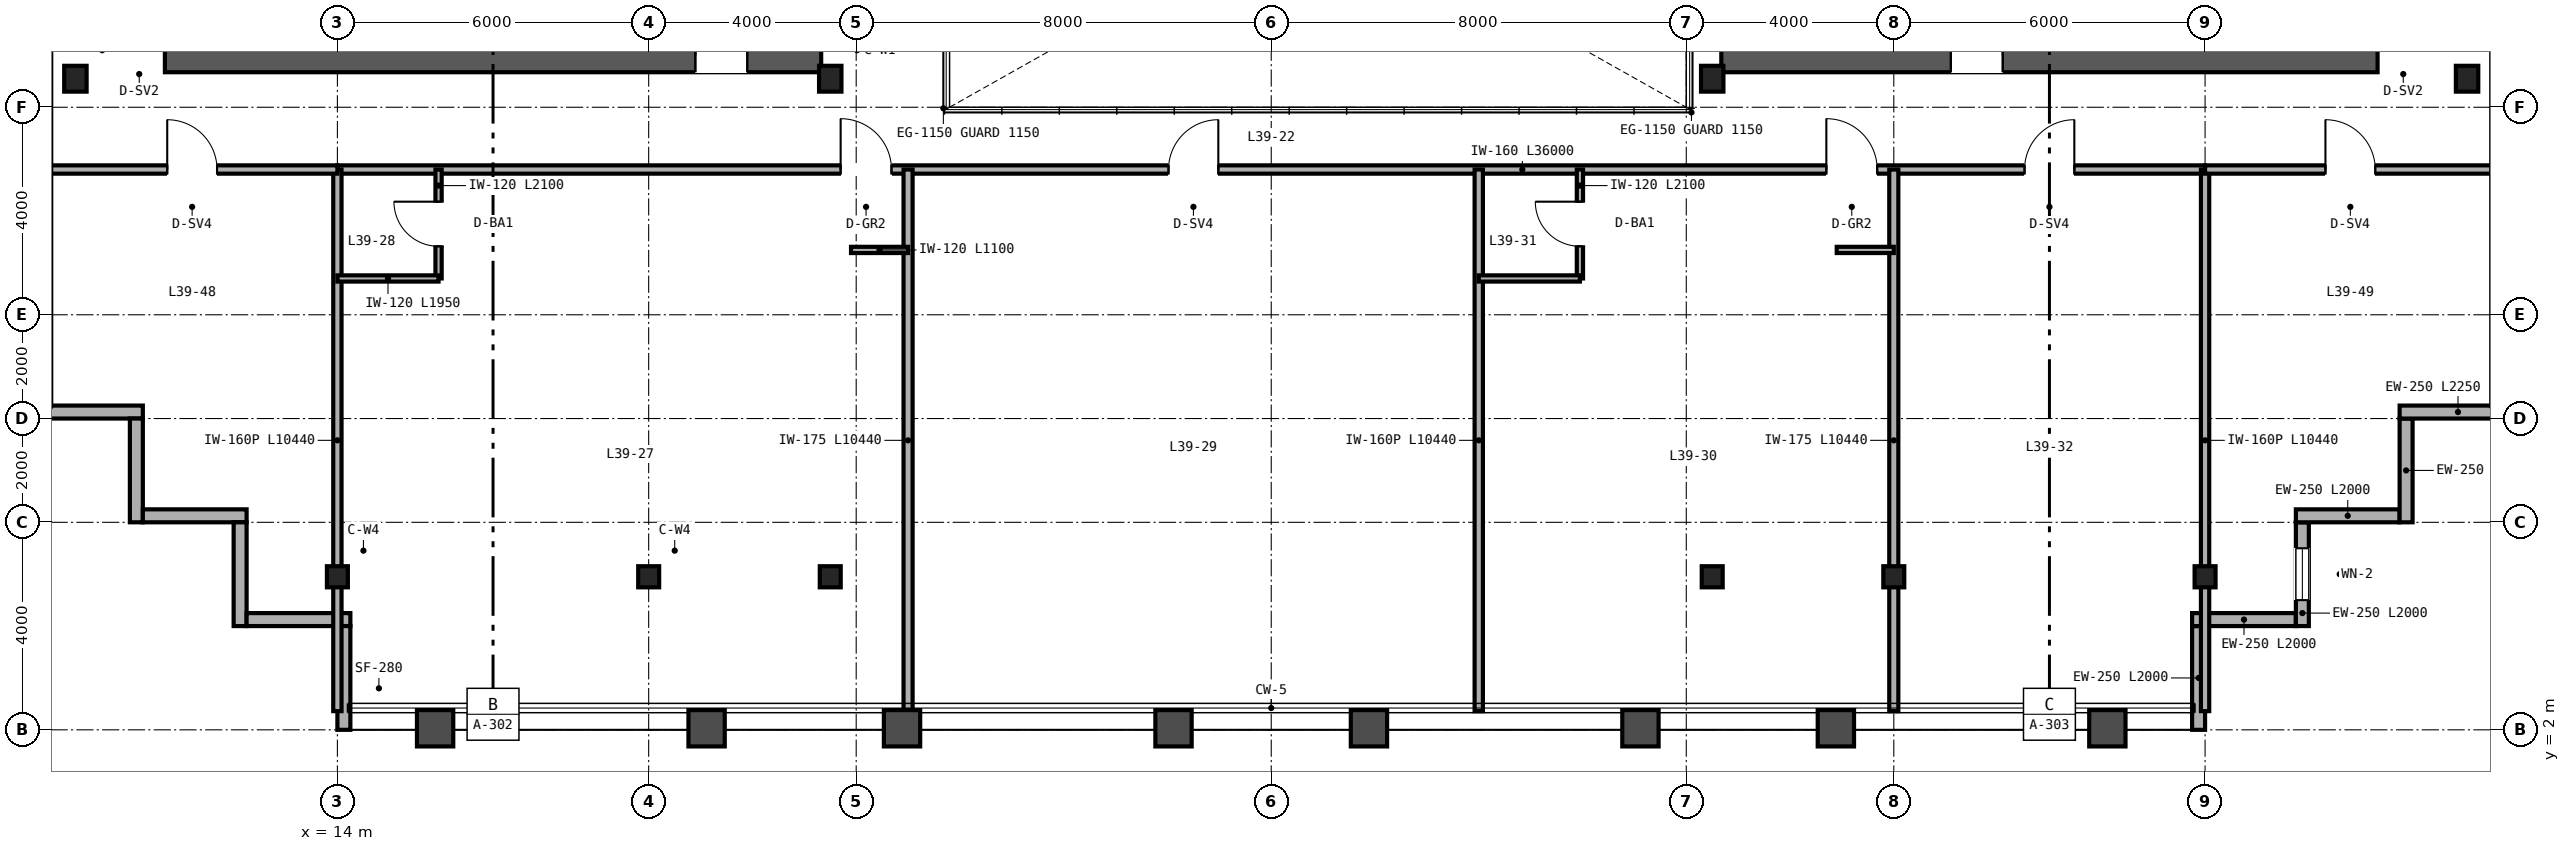
"""IFC4 building model, lengths in metres.
Left out: names, types, materials, properties, quantities, classifications, styles, units other than length and angle.
Written with IfcOpenShell. Run it as: python <this file> out.ifc"""

import sys

from ifc_helpers import new_model, si_unit, direction, frame, frame_2d, origin, origin_2d, place, context, subcontext, project, spatial, rectangle, i_section, extrude, source, transform, mapped, element, fill, save


model = new_model("IFC4")
c1 = context("Model", 3, precision=1e-05, world=origin(), true_north=direction((0.0, 1.0)))
c2 = subcontext(c1, "Body", "Model", "MODEL_VIEW")
j1 = project(units=[si_unit("LENGTHUNIT", "METRE"), si_unit("PLANEANGLEUNIT", "RADIAN")], contexts=[c1])
p1 = place(None, origin())
s1 = spatial("IfcSite", under=j1, at=p1, CompositionType="ELEMENT")
p2 = place(p1, origin())
s2 = spatial("IfcBuilding", under=s1, at=p2, CompositionType="ELEMENT")
p3 = place(p2, frame((0.0, 0.0, 158.4)))
s3 = spatial("IfcBuildingStorey", under=s2, at=p3, CompositionType="ELEMENT", Elevation=158.4)
p4 = place(p3, frame((10.675, 15.0, 0.0), z_axis=(0.0, 0.0, 1.0), x_axis=(1.0, 0.0, 0.0)))
e1 = element("IfcWall", 1, at=p4, inside=s3, PredefinedType="SHEAR", context=c2, shape_type="SweptSolid", body=[
    extrude(rectangle(XDim=12.65, YDim=0.65, at=frame_2d((6.325, 0.0))), origin(), (0.0, 0.0, 1.0), 4.57),
])
p5 = place(p4, frame((10.225, 0.0, 0.0)))
e2 = element("IfcOpeningElement", 2, at=p5, cuts=e1, PredefinedType="OPENING", context=c2, shape_type="SweptSolid", body=[
    extrude(rectangle(XDim=1.0, YDim=2.15, at=frame_2d((0.5, 1.075))), frame((0.0, 0.335, 0.0), z_axis=(0.0, -1.0, 0.0), x_axis=(1.0, 0.0, 0.0)), (0.0, 0.0, 1.0), 0.67),
])
p6 = place(p3, frame((40.675, 15.0, 0.0), z_axis=(0.0, 0.0, 1.0), x_axis=(1.0, 0.0, 0.0)))
e3 = element("IfcWall", 3, at=p6, inside=s3, PredefinedType="SHEAR", context=c2, shape_type="SweptSolid", body=[
    extrude(rectangle(XDim=12.65, YDim=0.65, at=frame_2d((6.325, 0.0))), origin(), (0.0, 0.0, 1.0), 4.57),
])
p7 = place(p6, frame((4.425, 0.0, 0.0)))
e4 = element("IfcOpeningElement", 4, at=p7, cuts=e3, PredefinedType="OPENING", context=c2, shape_type="SweptSolid", body=[
    extrude(rectangle(XDim=1.0, YDim=2.15, at=frame_2d((0.5, 1.075))), frame((0.0, 0.335, 0.0), z_axis=(0.0, -1.0, 0.0), x_axis=(1.0, 0.0, 0.0)), (0.0, 0.0, 1.0), 0.67),
])
m1 = source(origin(), c2, "Body", "SweptSolid", [
    extrude(i_section(OverallWidth=0.432, OverallDepth=0.498, WebThickness=0.056, FlangeThickness=0.089, FilletRadius=0.025, at=origin_2d()), origin(), (0.0, 0.0, 1.0), 4.57),
])
for number, where, z_axis, x_axis in (
    (5, (8.95, 14.55, 0.0), (0.0, 0.0, 1.0), (1.0, 0.0, 0.0)),
    (6, (23.5, 14.55, 0.0), (0.0, 0.0, 1.0), (1.0, 0.0, 0.0)),
    (7, (40.5, 14.55, 0.0), (0.0, 0.0, 1.0), (1.0, 0.0, 0.0)),
    (8, (55.05, 14.55, 0.0), (0.0, 0.0, 1.0), (1.0, 0.0, 0.0)),
):
    element("IfcColumn", number, at=place(p3, frame(where, z_axis=z_axis, x_axis=x_axis)), inside=s3, PredefinedType="COLUMN", context=c2, shape_type="MappedRepresentation", body=[
        mapped(m1, transform((0.0, 0.0, 0.0), scale=1.0)),
    ])
m2 = source(origin(), c2, "Body", "SweptSolid", [
    extrude(i_section(OverallWidth=0.404, OverallDepth=0.407, WebThickness=0.027, FlangeThickness=0.044, FilletRadius=0.025, at=origin_2d()), origin(), (0.0, 0.0, 1.0), 4.989),
])
for number, where, z_axis, x_axis in (
    (9, (14.0, 4.95, 0.0), (0.0, 0.401, 0.916), (-1.0, 0.0, 0.0)),
    (10, (20.0, 4.95, 0.0), (0.0, 0.401, 0.916), (-1.0, 0.0, 0.0)),
    (11, (23.5, 4.95, 0.0), (0.0, 0.401, 0.916), (-1.0, 0.0, 0.0)),
    (12, (40.5, 4.95, 0.0), (0.0, 0.401, 0.916), (-1.0, 0.0, 0.0)),
    (13, (44.0, 4.95, 0.0), (0.0, 0.401, 0.916), (-1.0, 0.0, 0.0)),
    (14, (50.0, 4.95, 0.0), (0.0, 0.401, 0.916), (-1.0, 0.0, 0.0)),
):
    element("IfcColumn", number, at=place(p3, frame(where, z_axis=z_axis, x_axis=x_axis)), inside=s3, PredefinedType="COLUMN", context=c2, shape_type="MappedRepresentation", body=[
        mapped(m2, transform((0.0, 0.0, 0.0), scale=1.0)),
    ])
for number, where, z_axis, x_axis in (
    (15, (49.875, 2.0, 0.0), (0.0, 0.0, 1.0), (0.0, 1.0, 0.0)),
    (16, (49.75, 4.125, 0.0), (0.0, 0.0, 1.0), (1.0, 0.0, 0.0)),
):
    element("IfcWall", number, at=place(p3, frame(where, z_axis=z_axis, x_axis=x_axis)), inside=s3, PredefinedType="SOLIDWALL", context=c2, shape_type="SweptSolid", body=[
        extrude(rectangle(XDim=2.0, YDim=0.25, at=frame_2d((1.0, 0.0))), origin(), (0.0, 0.0, 1.0), 4.033),
    ])
p8 = place(p3, frame((51.875, 4.0, 0.0), z_axis=(0.0, 0.0, 1.0), x_axis=(0.0, 1.0, 0.0)))
e17 = element("IfcWall", 17, at=p8, inside=s3, PredefinedType="SOLIDWALL", context=c2, shape_type="SweptSolid", body=[
    extrude(rectangle(XDim=2.0, YDim=0.25, at=frame_2d((1.0, 0.0))), origin(), (0.0, 0.0, 1.0), 4.57),
])
p9 = place(p8, frame((0.5, 0.0, 0.85)))
e18 = element("IfcOpeningElement", 18, at=p9, cuts=e17, PredefinedType="OPENING", context=c2, shape_type="SweptSolid", body=[
    extrude(rectangle(XDim=1.0, YDim=1.9, at=frame_2d((0.5, 0.95))), frame((0.0, 0.135, 0.0), z_axis=(0.0, -1.0, 0.0), x_axis=(1.0, 0.0, 0.0)), (0.0, 0.0, 1.0), 0.27),
])
for number, where, z_axis, x_axis in (
    (19, (51.75, 6.125, 0.0), (0.0, 0.0, 1.0), (1.0, 0.0, 0.0)),
    (20, (53.875, 6.0, 0.0), (0.0, 0.0, 1.0), (0.0, 1.0, 0.0)),
):
    element("IfcWall", number, at=place(p3, frame(where, z_axis=z_axis, x_axis=x_axis)), inside=s3, PredefinedType="SOLIDWALL", context=c2, shape_type="SweptSolid", body=[
        extrude(rectangle(XDim=2.0, YDim=0.25, at=frame_2d((1.0, 0.0))), origin(), (0.0, 0.0, 1.0), 4.57),
    ])
for number, where, z_axis, x_axis in (
    (21, (53.75, 8.125, 0.0), (0.0, 0.0, 1.0), (1.0, 0.0, 0.0)),
    (22, (8.0, 8.125, 0.0), (0.0, 0.0, 1.0), (1.0, 0.0, 0.0)),
):
    element("IfcWall", number, at=place(p3, frame(where, z_axis=z_axis, x_axis=x_axis)), inside=s3, PredefinedType="SOLIDWALL", context=c2, shape_type="SweptSolid", body=[
        extrude(rectangle(XDim=2.25, YDim=0.25, at=frame_2d((1.125, 0.0))), origin(), (0.0, 0.0, 1.0), 4.57),
    ])
for number, where, z_axis, x_axis in (
    (23, (10.125, 8.0, 0.0), (0.0, 0.0, 1.0), (0.0, -1.0, 0.0)),
    (24, (10.25, 6.125, 0.0), (0.0, 0.0, 1.0), (1.0, 0.0, 0.0)),
    (25, (12.125, 6.0, 0.0), (0.0, 0.0, 1.0), (0.0, -1.0, 0.0)),
):
    element("IfcWall", number, at=place(p3, frame(where, z_axis=z_axis, x_axis=x_axis)), inside=s3, PredefinedType="SOLIDWALL", context=c2, shape_type="SweptSolid", body=[
        extrude(rectangle(XDim=2.0, YDim=0.25, at=frame_2d((1.0, 0.0))), origin(), (0.0, 0.0, 1.0), 4.57),
    ])
for number, where, z_axis, x_axis in (
    (26, (12.25, 4.125, 0.0), (0.0, 0.0, 1.0), (1.0, 0.0, 0.0)),
    (27, (14.125, 4.0, 0.0), (0.0, 0.0, 1.0), (0.0, -1.0, 0.0)),
):
    element("IfcWall", number, at=place(p3, frame(where, z_axis=z_axis, x_axis=x_axis)), inside=s3, PredefinedType="SOLIDWALL", context=c2, shape_type="SweptSolid", body=[
        extrude(rectangle(XDim=2.0, YDim=0.25, at=frame_2d((1.0, 0.0))), origin(), (0.0, 0.0, 1.0), 4.033),
    ])
p10 = place(p3, frame((14.0, 12.8, 0.0), z_axis=(0.0, 0.0, 1.0), x_axis=(1.0, 0.0, 0.0)))
e28 = element("IfcWall", 28, at=p10, inside=s3, PredefinedType="PARTITIONING", context=c2, shape_type="SweptSolid", body=[
    extrude(rectangle(XDim=36.0, YDim=0.16, at=frame_2d((18.0, 0.0))), origin(), (0.0, 0.0, 1.0), 4.113),
])
p11 = place(p10, frame((9.7, 0.0, 0.0)))
e29 = element("IfcOpeningElement", 29, at=p11, cuts=e28, PredefinedType="OPENING", context=c2, shape_type="SweptSolid", body=[
    extrude(rectangle(XDim=0.98, YDim=2.2, at=frame_2d((0.49, 1.1))), frame((0.0, 0.09, 0.0), z_axis=(0.0, -1.0, 0.0), x_axis=(1.0, 0.0, 0.0)), (0.0, 0.0, 1.0), 0.18),
])
p12 = place(p10, frame((16.02, 0.0, 0.0)))
e30 = element("IfcOpeningElement", 30, at=p12, cuts=e28, PredefinedType="OPENING", context=c2, shape_type="SweptSolid", body=[
    extrude(rectangle(XDim=0.96, YDim=2.15, at=frame_2d((0.48, 1.075))), frame((0.0, 0.09, 0.0), z_axis=(0.0, -1.0, 0.0), x_axis=(1.0, 0.0, 0.0)), (0.0, 0.0, 1.0), 0.18),
])
p13 = place(p10, frame((28.7, 0.0, 0.0)))
e31 = element("IfcOpeningElement", 31, at=p13, cuts=e28, PredefinedType="OPENING", context=c2, shape_type="SweptSolid", body=[
    extrude(rectangle(XDim=0.98, YDim=2.2, at=frame_2d((0.49, 1.1))), frame((0.0, 0.09, 0.0), z_axis=(0.0, -1.0, 0.0), x_axis=(1.0, 0.0, 0.0)), (0.0, 0.0, 1.0), 0.18),
])
p14 = place(p10, frame((32.52, 0.0, 0.0)))
e32 = element("IfcOpeningElement", 32, at=p14, cuts=e28, PredefinedType="OPENING", context=c2, shape_type="SweptSolid", body=[
    extrude(rectangle(XDim=0.96, YDim=2.15, at=frame_2d((0.48, 1.075))), frame((0.0, 0.09, 0.0), z_axis=(0.0, -1.0, 0.0), x_axis=(1.0, 0.0, 0.0)), (0.0, 0.0, 1.0), 0.18),
])
for number, where, z_axis, x_axis in (
    (33, (14.0, 2.36, 0.0), (0.0, 0.0, 1.0), (0.0, 1.0, 0.0)),
    (34, (50.0, 2.36, 0.0), (0.0, 0.0, 1.0), (0.0, 1.0, 0.0)),
):
    element("IfcWall", number, at=place(p3, frame(where, z_axis=z_axis, x_axis=x_axis)), inside=s3, PredefinedType="PARTITIONING", context=c2, shape_type="SweptSolid", body=[
        extrude(rectangle(XDim=10.44, YDim=0.16, at=frame_2d((5.22, 0.0))), origin(), (0.0, 0.0, 1.0), 3.877),
    ])
p15 = place(p3, frame((25.0, 2.36, 0.0), z_axis=(0.0, 0.0, 1.0), x_axis=(0.0, 1.0, 0.0)))
e35 = element("IfcWall", 35, at=p15, inside=s3, PredefinedType="PARTITIONING", context=c2, shape_type="SweptSolid", body=[
    extrude(rectangle(XDim=10.44, YDim=0.175, at=frame_2d((5.22, 0.0))), origin(), (0.0, 0.0, 1.0), 3.643),
])
p16 = place(p3, frame((15.95, 10.7, 0.0), z_axis=(0.0, 0.0, 1.0), x_axis=(0.0, 1.0, 0.0)))
e36 = element("IfcWall", 36, at=p16, inside=s3, PredefinedType="PARTITIONING", context=c2, shape_type="SweptSolid", body=[
    extrude(rectangle(XDim=2.1, YDim=0.12, at=frame_2d((1.05, 0.0))), origin(), (0.0, 0.0, 1.0), 4.57),
])
p17 = place(p16, frame((0.62, 0.0, 0.0)))
e37 = element("IfcOpeningElement", 37, at=p17, cuts=e36, PredefinedType="OPENING", context=c2, shape_type="SweptSolid", body=[
    extrude(rectangle(XDim=0.86, YDim=2.1, at=frame_2d((0.43, 1.05))), frame((0.0, 0.07, 0.0), z_axis=(0.0, -1.0, 0.0), x_axis=(1.0, 0.0, 0.0)), (0.0, 0.0, 1.0), 0.14),
])
p18 = place(p3, frame((14.0, 10.7, 0.0), z_axis=(0.0, 0.0, 1.0), x_axis=(1.0, 0.0, 0.0)))
e38 = element("IfcWall", 38, at=p18, inside=s3, PredefinedType="PARTITIONING", context=c2, shape_type="SweptSolid", body=[
    extrude(rectangle(XDim=1.95, YDim=0.12, at=frame_2d((0.975, 0.0))), origin(), (0.0, 0.0, 1.0), 4.57),
])
p19 = place(p3, frame((23.9, 11.25, 0.0), z_axis=(0.0, 0.0, 1.0), x_axis=(1.0, 0.0, 0.0)))
e39 = element("IfcWall", 39, at=p19, inside=s3, PredefinedType="PARTITIONING", context=c2, shape_type="SweptSolid", body=[
    extrude(rectangle(XDim=1.1, YDim=0.12, at=frame_2d((0.55, 0.0))), origin(), (0.0, 0.0, 1.0), 4.57),
])
p20 = place(p3, frame((36.0, 2.36, 0.0), z_axis=(0.0, 0.0, 1.0), x_axis=(0.0, 1.0, 0.0)))
e40 = element("IfcWall", 40, at=p20, inside=s3, PredefinedType="PARTITIONING", context=c2, shape_type="SweptSolid", body=[
    extrude(rectangle(XDim=10.44, YDim=0.16, at=frame_2d((5.22, 0.0))), origin(), (0.0, 0.0, 1.0), 3.643),
])
p21 = place(p3, frame((44.0, 2.36, 0.0), z_axis=(0.0, 0.0, 1.0), x_axis=(0.0, 1.0, 0.0)))
e41 = element("IfcWall", 41, at=p21, inside=s3, PredefinedType="PARTITIONING", context=c2, shape_type="SweptSolid", body=[
    extrude(rectangle(XDim=10.44, YDim=0.175, at=frame_2d((5.22, 0.0))), origin(), (0.0, 0.0, 1.0), 3.877),
])
p22 = place(p3, frame((37.95, 10.7, 0.0), z_axis=(0.0, 0.0, 1.0), x_axis=(0.0, 1.0, 0.0)))
e42 = element("IfcWall", 42, at=p22, inside=s3, PredefinedType="PARTITIONING", context=c2, shape_type="SweptSolid", body=[
    extrude(rectangle(XDim=2.1, YDim=0.12, at=frame_2d((1.05, 0.0))), origin(), (0.0, 0.0, 1.0), 4.57),
])
p23 = place(p22, frame((0.62, 0.0, 0.0)))
e43 = element("IfcOpeningElement", 43, at=p23, cuts=e42, PredefinedType="OPENING", context=c2, shape_type="SweptSolid", body=[
    extrude(rectangle(XDim=0.86, YDim=2.1, at=frame_2d((0.43, 1.05))), frame((0.0, 0.07, 0.0), z_axis=(0.0, -1.0, 0.0), x_axis=(1.0, 0.0, 0.0)), (0.0, 0.0, 1.0), 0.14),
])
p24 = place(p3, frame((36.0, 10.7, 0.0), z_axis=(0.0, 0.0, 1.0), x_axis=(1.0, 0.0, 0.0)))
e44 = element("IfcWall", 44, at=p24, inside=s3, PredefinedType="PARTITIONING", context=c2, shape_type="SweptSolid", body=[
    extrude(rectangle(XDim=1.95, YDim=0.12, at=frame_2d((0.975, 0.0))), origin(), (0.0, 0.0, 1.0), 4.57),
])
p25 = place(p3, frame((42.9, 11.25, 0.0), z_axis=(0.0, 0.0, 1.0), x_axis=(1.0, 0.0, 0.0)))
e45 = element("IfcWall", 45, at=p25, inside=s3, PredefinedType="PARTITIONING", context=c2, shape_type="SweptSolid", body=[
    extrude(rectangle(XDim=1.1, YDim=0.12, at=frame_2d((0.55, 0.0))), origin(), (0.0, 0.0, 1.0), 4.57),
])
p26 = place(p3, frame((8.4, 12.8, 0.0), z_axis=(0.0, 0.0, 1.0), x_axis=(1.0, 0.0, 0.0)))
e46 = element("IfcWall", 46, at=p26, inside=s3, PredefinedType="PARTITIONING", context=c2, shape_type="SweptSolid", body=[
    extrude(rectangle(XDim=5.6, YDim=0.16, at=frame_2d((2.8, 0.0))), origin(), (0.0, 0.0, 1.0), 4.57),
])
p27 = place(p26, frame((2.32, 0.0, 0.0)))
e47 = element("IfcOpeningElement", 47, at=p27, cuts=e46, PredefinedType="OPENING", context=c2, shape_type="SweptSolid", body=[
    extrude(rectangle(XDim=0.96, YDim=2.15, at=frame_2d((0.48, 1.075))), frame((0.0, 0.09, 0.0), z_axis=(0.0, -1.0, 0.0), x_axis=(1.0, 0.0, 0.0)), (0.0, 0.0, 1.0), 0.18),
])
p28 = place(p3, frame((50.0, 12.8, 0.0), z_axis=(0.0, 0.0, 1.0), x_axis=(1.0, 0.0, 0.0)))
e48 = element("IfcWall", 48, at=p28, inside=s3, PredefinedType="PARTITIONING", context=c2, shape_type="SweptSolid", body=[
    extrude(rectangle(XDim=5.6, YDim=0.16, at=frame_2d((2.8, 0.0))), origin(), (0.0, 0.0, 1.0), 4.57),
])
p29 = place(p28, frame((2.32, 0.0, 0.0)))
e49 = element("IfcOpeningElement", 49, at=p29, cuts=e48, PredefinedType="OPENING", context=c2, shape_type="SweptSolid", body=[
    extrude(rectangle(XDim=0.96, YDim=2.15, at=frame_2d((0.48, 1.075))), frame((0.0, 0.09, 0.0), z_axis=(0.0, -1.0, 0.0), x_axis=(1.0, 0.0, 0.0)), (0.0, 0.0, 1.0), 0.18),
])
m3 = source(origin(), c2, "Body", "SweptSolid", [
    extrude(rectangle(XDim=1.0, YDim=1.9, at=frame_2d((0.5, 0.95))), frame((0.0, 0.03, 0.0), z_axis=(0.0, -1.0, 0.0), x_axis=(1.0, 0.0, 0.0)), (0.0, 0.0, 1.0), 0.06),
])
p30 = place(p9, origin())
e50 = element("IfcWindow", 50, at=p30, inside=s3, PartitioningType="SINGLE_PANEL", PredefinedType="WINDOW", context=c2, shape_type="MappedRepresentation", body=[
    mapped(m3, transform((0.0, 0.0, 0.0), scale=1.0)),
])
fill(e18, e50)
m4 = source(origin(), c2, "Body", "SweptSolid", [
    extrude(rectangle(XDim=1.0, YDim=2.15, at=frame_2d((0.5, 1.075))), frame((0.0, 0.025, 0.0), z_axis=(0.0, -1.0, 0.0), x_axis=(1.0, 0.0, 0.0)), (0.0, 0.0, 1.0), 0.05),
])
p31 = place(p5, origin())
e51 = element("IfcDoor", 51, at=p31, inside=s3, OperationType="SINGLE_SWING_LEFT", PredefinedType="DOOR", context=c2, shape_type="MappedRepresentation", body=[
    mapped(m4, transform((0.0, 0.0, 0.0), scale=1.0)),
])
fill(e2, e51)
p32 = place(p7, origin())
e52 = element("IfcDoor", 52, at=p32, inside=s3, OperationType="SINGLE_SWING_RIGHT", PredefinedType="DOOR", context=c2, shape_type="MappedRepresentation", body=[
    mapped(m4, transform((0.0, 0.0, 0.0), scale=1.0)),
])
fill(e4, e52)
m5 = source(origin(), c2, "Body", "SweptSolid", [
    extrude(rectangle(XDim=0.86, YDim=2.1, at=frame_2d((0.43, 1.05))), frame((0.0, 0.025, 0.0), z_axis=(0.0, -1.0, 0.0), x_axis=(1.0, 0.0, 0.0)), (0.0, 0.0, 1.0), 0.05),
])
p33 = place(p17, origin())
e53 = element("IfcDoor", 53, at=p33, inside=s3, OperationType="SINGLE_SWING_RIGHT", PredefinedType="DOOR", context=c2, shape_type="MappedRepresentation", body=[
    mapped(m5, transform((0.0, 0.0, 0.0), scale=1.0)),
])
fill(e37, e53)
p34 = place(p23, origin())
e54 = element("IfcDoor", 54, at=p34, inside=s3, OperationType="SINGLE_SWING_RIGHT", PredefinedType="DOOR", context=c2, shape_type="MappedRepresentation", body=[
    mapped(m5, transform((0.0, 0.0, 0.0), scale=1.0)),
])
fill(e43, e54)
m6 = source(origin(), c2, "Body", "SweptSolid", [
    extrude(rectangle(XDim=0.98, YDim=2.2, at=frame_2d((0.49, 1.1))), frame((0.0, 0.025, 0.0), z_axis=(0.0, -1.0, 0.0), x_axis=(1.0, 0.0, 0.0)), (0.0, 0.0, 1.0), 0.05),
])
p35 = place(p11, origin())
e55 = element("IfcDoor", 55, at=p35, inside=s3, OperationType="SINGLE_SWING_LEFT", PredefinedType="DOOR", context=c2, shape_type="MappedRepresentation", body=[
    mapped(m6, transform((0.0, 0.0, 0.0), scale=1.0)),
])
fill(e29, e55)
m7 = source(origin(), c2, "Body", "SweptSolid", [
    extrude(rectangle(XDim=0.96, YDim=2.15, at=frame_2d((0.48, 1.075))), frame((0.0, 0.025, 0.0), z_axis=(0.0, -1.0, 0.0), x_axis=(1.0, 0.0, 0.0)), (0.0, 0.0, 1.0), 0.05),
])
p36 = place(p12, origin())
e56 = element("IfcDoor", 56, at=p36, inside=s3, OperationType="SINGLE_SWING_RIGHT", PredefinedType="DOOR", context=c2, shape_type="MappedRepresentation", body=[
    mapped(m7, transform((0.0, 0.0, 0.0), scale=1.0)),
])
fill(e30, e56)
p37 = place(p13, origin())
e57 = element("IfcDoor", 57, at=p37, inside=s3, OperationType="SINGLE_SWING_LEFT", PredefinedType="DOOR", context=c2, shape_type="MappedRepresentation", body=[
    mapped(m6, transform((0.0, 0.0, 0.0), scale=1.0)),
])
fill(e31, e57)
p38 = place(p14, origin())
e58 = element("IfcDoor", 58, at=p38, inside=s3, OperationType="SINGLE_SWING_RIGHT", PredefinedType="DOOR", context=c2, shape_type="MappedRepresentation", body=[
    mapped(m7, transform((0.0, 0.0, 0.0), scale=1.0)),
])
fill(e32, e58)
p39 = place(p27, origin())
e59 = element("IfcDoor", 59, at=p39, inside=s3, OperationType="SINGLE_SWING_LEFT", PredefinedType="DOOR", context=c2, shape_type="MappedRepresentation", body=[
    mapped(m7, transform((0.0, 0.0, 0.0), scale=1.0)),
])
fill(e47, e59)
p40 = place(p29, origin())
e60 = element("IfcDoor", 60, at=p40, inside=s3, OperationType="SINGLE_SWING_LEFT", PredefinedType="DOOR", context=c2, shape_type="MappedRepresentation", body=[
    mapped(m7, transform((0.0, 0.0, 0.0), scale=1.0)),
])
fill(e49, e60)
save(model, sys.argv[1])
